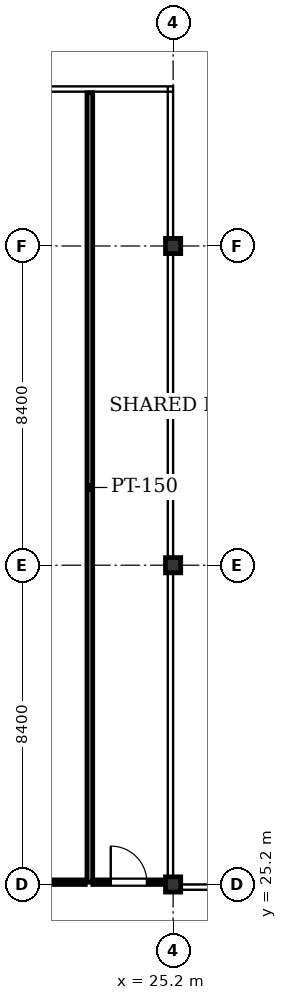
"""IFC4 building model, lengths in metres.
Left out: names, types, materials, properties, quantities, classifications, styles, units other than length and angle.
Written with IfcOpenShell. Run it as: python <this file> out.ifc"""

import sys

from ifc_helpers import new_model, si_unit, direction, frame, frame_2d, origin, origin_2d, place, context, subcontext, project, spatial, rectangle, i_section, extrude, element, fill, save


model = new_model("IFC4")
c1 = context("Model", 3, precision=1e-05, world=origin(), true_north=direction((0.0, 1.0)))
c2 = subcontext(c1, "Body", "Model", "MODEL_VIEW")
j1 = project(units=[si_unit("LENGTHUNIT", "METRE"), si_unit("PLANEANGLEUNIT", "RADIAN")], contexts=[c1])
p1 = place(None, origin())
s1 = spatial("IfcSite", under=j1, at=p1, CompositionType="ELEMENT")
p2 = place(p1, origin())
s2 = spatial("IfcBuilding", under=s1, at=p2, CompositionType="ELEMENT")
p3 = place(p2, frame((0.0, 0.0, 109.0)))
s3 = spatial("IfcBuildingStorey", under=s2, at=p3, CompositionType="ELEMENT", Elevation=109.0)
for number, where, z_axis, x_axis in (
    (1, (25.2, 25.2, 0.0), (0.0, 0.0, 1.0), (1.0, 0.0, 0.0)),
    (2, (25.2, 33.6, 0.0), (0.0, 0.0, 1.0), (1.0, 0.0, 0.0)),
    (3, (25.2, 42.0, 0.0), (0.0, 0.0, 1.0), (1.0, 0.0, 0.0)),
):
    element("IfcColumn", number, at=place(p3, frame(where, z_axis=z_axis, x_axis=x_axis)), inside=s3, PredefinedType="COLUMN", context=c2, shape_type="SweptSolid", body=[
        extrude(i_section(OverallWidth=0.4, OverallDepth=0.4, WebThickness=0.025, FlangeThickness=0.04, at=origin_2d()), origin(), (0.0, 0.0, 1.0), 4.1),
    ])
p4 = place(p3, frame((23.009, 46.031, 0.0), z_axis=(0.0, 0.0, 1.0), x_axis=(0.0, -1.0, 0.0)))
e4 = element("IfcWall", 4, at=p4, inside=s3, PredefinedType="PARTITIONING", context=c2, shape_type="SweptSolid", body=[
    extrude(rectangle(XDim=20.771, YDim=0.15, at=frame_2d((10.385, 0.0))), origin(), (0.0, 0.0, 1.0), 3.217),
])
p5 = place(p3, frame((23.088, 25.26, 0.0), z_axis=(0.0, 0.0, 1.0), x_axis=(1.0, 0.0, 0.0)))
e5 = element("IfcWall", 5, at=p5, inside=s3, PredefinedType="PARTITIONING", context=c2, shape_type="SweptSolid", body=[
    extrude(rectangle(XDim=1.892, YDim=0.12, at=frame_2d((0.946, 0.0))), origin(), (0.0, 0.0, 1.0), 3.217),
])
p6 = place(p5, frame((0.471, 0.0, 0.0)))
e6 = element("IfcOpeningElement", 6, at=p6, cuts=e5, PredefinedType="OPENING", context=c2, shape_type="SweptSolid", body=[
    extrude(rectangle(XDim=0.95, YDim=2.15, at=frame_2d((0.475, 1.075))), frame((0.0, 0.07, 0.0), z_axis=(0.0, -1.0, 0.0), x_axis=(1.0, 0.0, 0.0)), (0.0, 0.0, 1.0), 0.14),
])
p7 = place(p3, frame((20.039, 25.26, 0.0), z_axis=(0.0, 0.0, 1.0), x_axis=(1.0, 0.0, 0.0)))
e7 = element("IfcWall", 7, at=p7, inside=s3, PredefinedType="PARTITIONING", context=c2, shape_type="SweptSolid", body=[
    extrude(rectangle(XDim=2.85, YDim=0.12, at=frame_2d((1.425, 0.0))), origin(), (0.0, 0.0, 1.0), 3.217),
])
p8 = place(p6, origin())
e8 = element("IfcDoor", 8, at=p8, inside=s3, OperationType="SINGLE_SWING_LEFT", PredefinedType="DOOR", context=c2, shape_type="SweptSolid", body=[
    extrude(rectangle(XDim=0.95, YDim=2.15, at=frame_2d((0.475, 1.075))), frame((0.0, 0.025, 0.0), z_axis=(0.0, -1.0, 0.0), x_axis=(1.0, 0.0, 0.0)), (0.0, 0.0, 1.0), 0.05),
])
fill(e6, e8)
save(model, sys.argv[1])
